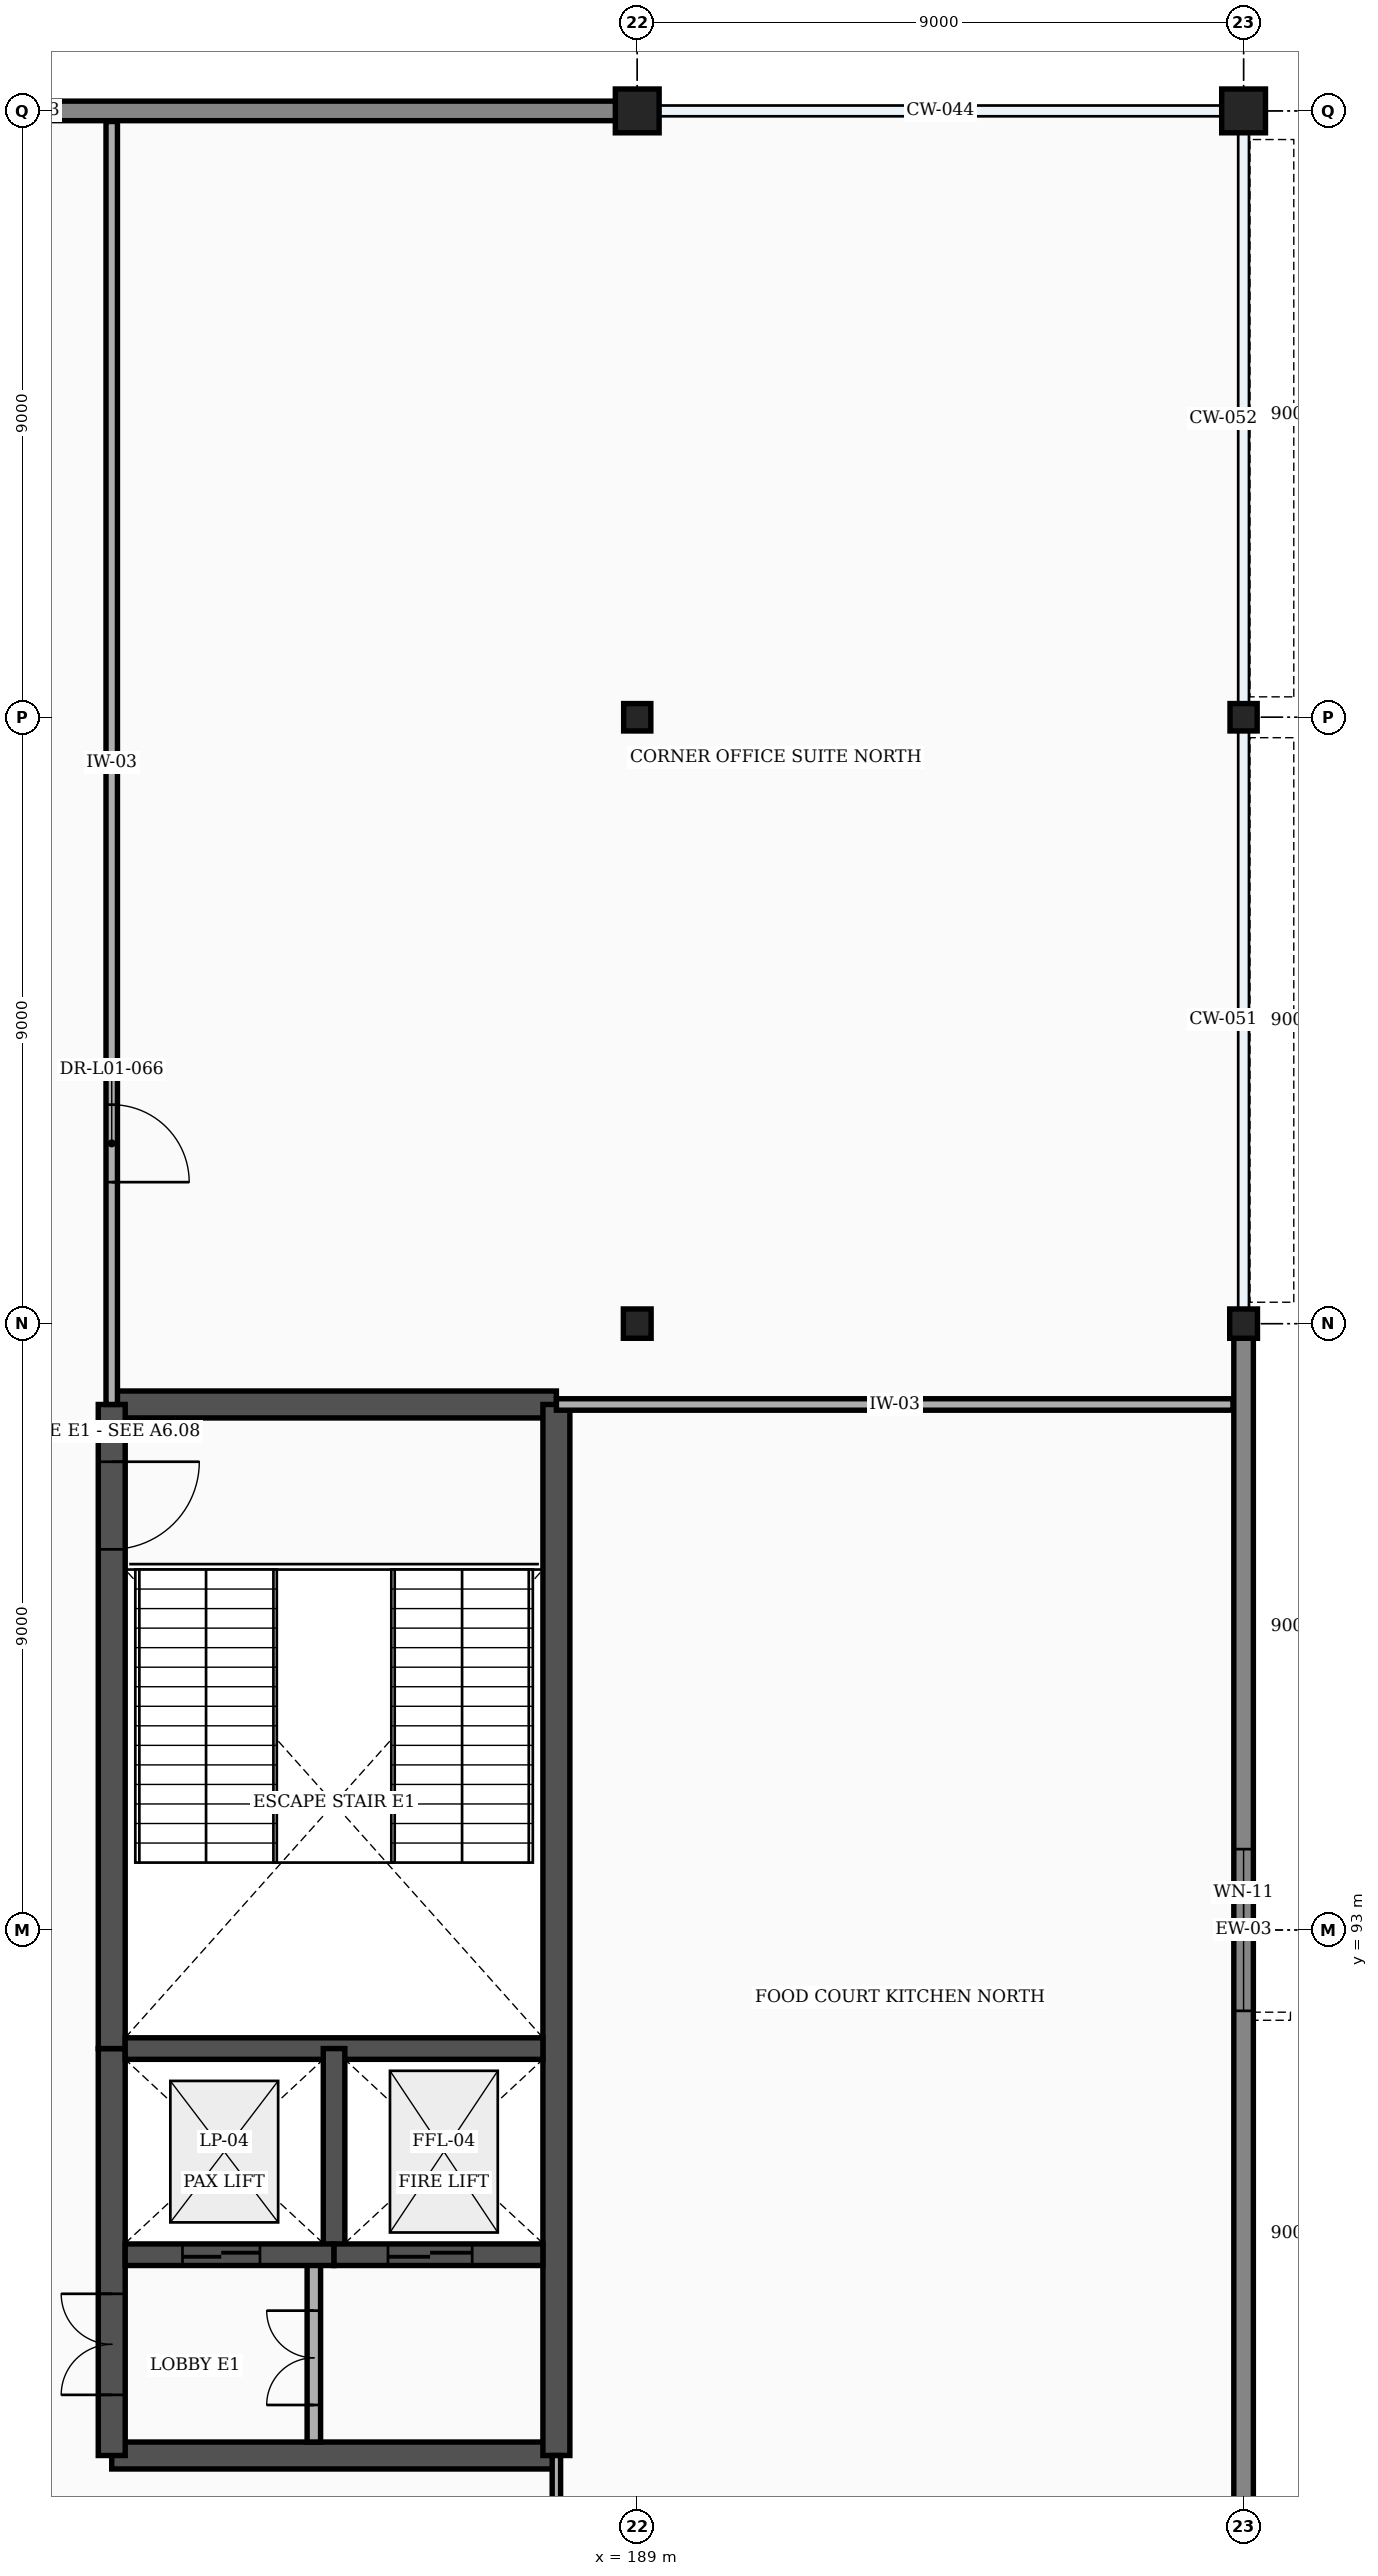
"""IFC4 building model, lengths in metres.
Left out: names, types, materials, properties, quantities, classifications, styles, units other than length and angle.
Written with IfcOpenShell. Run it as: python <this file> out.ifc"""

import sys

from ifc_helpers import new_model, si_unit, direction, frame, frame_2d, origin, origin_2d, place, context, subcontext, project, spatial, rectangle, i_section, extrude, element, fill, save


model = new_model("IFC4")
c1 = context("Model", 3, precision=1e-05, world=origin(), true_north=direction((0.0, 1.0)))
c2 = subcontext(c1, "Body", "Model", "MODEL_VIEW")
j1 = project(units=[si_unit("LENGTHUNIT", "METRE"), si_unit("PLANEANGLEUNIT", "RADIAN")], contexts=[c1])
p1 = place(None, origin())
s1 = spatial("IfcSite", under=j1, at=p1, CompositionType="ELEMENT")
p2 = place(p1, origin())
s2 = spatial("IfcBuilding", under=s1, at=p2, CompositionType="ELEMENT")
p3 = place(p2, frame((0.0, 0.0, 6.0)))
s3 = spatial("IfcBuildingStorey", under=s2, at=p3, CompositionType="ELEMENT", Elevation=6.0)
p4 = place(p3, frame((189.0, 102.0, 0.0), z_axis=(0.0, 0.0, 1.0), x_axis=(1.0, 0.0, 0.0)))
e1 = element("IfcColumn", 1, at=p4, inside=s3, PredefinedType="COLUMN", context=c2, shape_type="SweptSolid", body=[
    extrude(i_section(OverallWidth=0.412, OverallDepth=0.435, WebThickness=0.036, FlangeThickness=0.058, at=origin_2d()), origin(), (0.0, 0.0, 1.0), 5.4),
])
p5 = place(p3, frame((189.0, 111.0, 0.0), z_axis=(0.0, 0.0, 1.0), x_axis=(1.0, 0.0, 0.0)))
e2 = element("IfcColumn", 2, at=p5, inside=s3, PredefinedType="COLUMN", context=c2, shape_type="SweptSolid", body=[
    extrude(i_section(OverallWidth=0.403, OverallDepth=0.406, WebThickness=0.027, FlangeThickness=0.043, at=origin_2d()), origin(), (0.0, 0.0, 1.0), 5.4),
])
p6 = place(p3, frame((189.0, 120.0, 0.0), z_axis=(0.0, 0.0, 1.0), x_axis=(1.0, 0.0, 0.0)))
e3 = element("IfcColumn", 3, at=p6, inside=s3, PredefinedType="COLUMN", context=c2, shape_type="SweptSolid", body=[
    extrude(rectangle(XDim=0.65, YDim=0.65, at=origin_2d()), origin(), (0.0, 0.0, 1.0), 5.4),
])
p7 = place(p3, frame((198.0, 102.0, 0.0), z_axis=(0.0, 0.0, 1.0), x_axis=(1.0, 0.0, 0.0)))
e4 = element("IfcColumn", 4, at=p7, inside=s3, PredefinedType="COLUMN", context=c2, shape_type="SweptSolid", body=[
    extrude(i_section(OverallWidth=0.412, OverallDepth=0.435, WebThickness=0.036, FlangeThickness=0.058, at=origin_2d()), origin(), (0.0, 0.0, 1.0), 5.4),
])
p8 = place(p3, frame((198.0, 111.0, 0.0), z_axis=(0.0, 0.0, 1.0), x_axis=(1.0, 0.0, 0.0)))
e5 = element("IfcColumn", 5, at=p8, inside=s3, PredefinedType="COLUMN", context=c2, shape_type="SweptSolid", body=[
    extrude(i_section(OverallWidth=0.403, OverallDepth=0.406, WebThickness=0.027, FlangeThickness=0.043, at=origin_2d()), origin(), (0.0, 0.0, 1.0), 5.4),
])
p9 = place(p3, frame((198.0, 120.0, 0.0), z_axis=(0.0, 0.0, 1.0), x_axis=(1.0, 0.0, 0.0)))
e6 = element("IfcColumn", 6, at=p9, inside=s3, PredefinedType="COLUMN", context=c2, shape_type="SweptSolid", body=[
    extrude(rectangle(XDim=0.65, YDim=0.65, at=origin_2d()), origin(), (0.0, 0.0, 1.0), 5.4),
])
p10 = place(p3, frame((171.317, 120.0, 0.0), z_axis=(0.0, 0.0, 1.0), x_axis=(1.0, 0.0, 0.0)))
e7 = element("IfcWall", 7, at=p10, inside=s3, PredefinedType="STANDARD", context=c2, shape_type="SweptSolid", body=[
    extrude(rectangle(XDim=17.366, YDim=0.29, at=frame_2d((8.683, 0.0))), origin(), (0.0, 0.0, 1.0), 4.388),
])
p11 = place(p10, frame((0.65, 0.0, 0.85)))
e8 = element("IfcOpeningElement", 8, at=p11, cuts=e7, PredefinedType="OPENING", context=c2, shape_type="SweptSolid", body=[
    extrude(rectangle(XDim=2.4, YDim=2.6, at=frame_2d((1.2, 1.3))), frame((0.0, 0.157, 0.0), z_axis=(0.0, -1.0, 0.0), x_axis=(1.0, 0.0, 0.0)), (0.0, 0.0, 1.0), 0.314),
])
p12 = place(p3, frame((198.0, 84.198, 0.0), z_axis=(0.0, 0.0, 1.0), x_axis=(0.0, 1.0, 0.0)))
e9 = element("IfcWall", 9, at=p12, inside=s3, PredefinedType="STANDARD", context=c2, shape_type="SweptSolid", body=[
    extrude(rectangle(XDim=17.603, YDim=0.29, at=frame_2d((8.802, 0.0))), origin(), (0.0, 0.0, 1.0), 4.467),
])
p13 = place(p12, frame((7.602, 0.0, 0.85)))
e10 = element("IfcOpeningElement", 10, at=p13, cuts=e9, PredefinedType="OPENING", context=c2, shape_type="SweptSolid", body=[
    extrude(rectangle(XDim=2.4, YDim=2.6, at=frame_2d((1.2, 1.3))), frame((0.0, 0.157, 0.0), z_axis=(0.0, -1.0, 0.0), x_axis=(1.0, 0.0, 0.0)), (0.0, 0.0, 1.0), 0.314),
])
for number, where, z_axis, x_axis in (
    (11, (181.2, 85.2, 0.0), (0.0, 0.0, 1.0), (1.0, 0.0, 0.0)),
    (12, (181.2, 100.8, 0.0), (0.0, 0.0, 1.0), (1.0, 0.0, 0.0)),
):
    element("IfcWall", number, at=place(p3, frame(where, z_axis=z_axis, x_axis=x_axis)), inside=s3, PredefinedType="SHEAR", context=c2, shape_type="SweptSolid", body=[
        extrude(rectangle(XDim=6.6, YDim=0.4, at=frame_2d((3.3, 0.0))), origin(), (0.0, 0.0, 1.0), 5.15),
    ])
p14 = place(p3, frame((187.8, 85.2, 0.0), z_axis=(0.0, 0.0, 1.0), x_axis=(0.0, 1.0, 0.0)))
e13 = element("IfcWall", 13, at=p14, inside=s3, PredefinedType="SHEAR", context=c2, shape_type="SweptSolid", body=[
    extrude(rectangle(XDim=15.6, YDim=0.4, at=frame_2d((7.8, 0.0))), origin(), (0.0, 0.0, 1.0), 5.15),
])
p15 = place(p3, frame((181.2, 85.2, 0.0), z_axis=(0.0, 0.0, 1.0), x_axis=(0.0, 1.0, 0.0)))
e14 = element("IfcWall", 14, at=p15, inside=s3, PredefinedType="SHEAR", context=c2, shape_type="SweptSolid", body=[
    extrude(rectangle(XDim=6.04, YDim=0.4, at=frame_2d((3.02, 0.0))), origin(), (0.0, 0.0, 1.0), 5.15),
])
p16 = place(p15, frame((0.9, 0.0, 0.0)))
e15 = element("IfcOpeningElement", 15, at=p16, cuts=e14, PredefinedType="OPENING", context=c2, shape_type="SweptSolid", body=[
    extrude(rectangle(XDim=1.5, YDim=2.2, at=frame_2d((0.75, 1.1))), frame((0.0, 0.212, 0.0), z_axis=(0.0, -1.0, 0.0), x_axis=(1.0, 0.0, 0.0)), (0.0, 0.0, 1.0), 0.424),
])
p17 = place(p3, frame((181.2, 91.24, 0.0), z_axis=(0.0, 0.0, 1.0), x_axis=(0.0, 1.0, 0.0)))
e16 = element("IfcWall", 16, at=p17, inside=s3, PredefinedType="SHEAR", context=c2, shape_type="SweptSolid", body=[
    extrude(rectangle(XDim=9.56, YDim=0.4, at=frame_2d((4.78, 0.0))), origin(), (0.0, 0.0, 1.0), 5.15),
])
p18 = place(p17, frame((7.41, 0.0, 0.0)))
e17 = element("IfcOpeningElement", 17, at=p18, cuts=e16, PredefinedType="OPENING", context=c2, shape_type="SweptSolid", body=[
    extrude(rectangle(XDim=1.3, YDim=2.2, at=frame_2d((0.65, 1.1))), frame((0.0, 0.212, 0.0), z_axis=(0.0, -1.0, 0.0), x_axis=(1.0, 0.0, 0.0)), (0.0, 0.0, 1.0), 0.424),
])
p19 = place(p3, frame((181.4, 91.24, 0.0), z_axis=(0.0, 0.0, 1.0), x_axis=(1.0, 0.0, 0.0)))
e18 = element("IfcWall", 18, at=p19, inside=s3, PredefinedType="SHEAR", context=c2, shape_type="SweptSolid", body=[
    extrude(rectangle(XDim=6.2, YDim=0.32, at=frame_2d((3.1, 0.0))), origin(), (0.0, 0.0, 1.0), 5.15),
])
p20 = place(p3, frame((184.5, 88.18, 0.0), z_axis=(0.0, 0.0, 1.0), x_axis=(0.0, 1.0, 0.0)))
e19 = element("IfcWall", 19, at=p20, inside=s3, PredefinedType="SHEAR", context=c2, shape_type="SweptSolid", body=[
    extrude(rectangle(XDim=3.06, YDim=0.32, at=frame_2d((1.53, 0.0))), origin(), (0.0, 0.0, 1.0), 5.15),
])
p21 = place(p3, frame((184.2, 85.4, 0.0), z_axis=(0.0, 0.0, 1.0), x_axis=(0.0, 1.0, 0.0)))
e20 = element("IfcWall", 20, at=p21, inside=s3, PredefinedType="PARTITIONING", context=c2, shape_type="SweptSolid", body=[
    extrude(rectangle(XDim=2.78, YDim=0.2, at=frame_2d((1.39, 0.0))), origin(), (0.0, 0.0, 1.0), 5.15),
])
p22 = place(p21, frame((0.55, 0.0, 0.0)))
e21 = element("IfcOpeningElement", 21, at=p22, cuts=e20, PredefinedType="OPENING", context=c2, shape_type="SweptSolid", body=[
    extrude(rectangle(XDim=1.4, YDim=2.25, at=frame_2d((0.7, 1.125))), frame((0.0, 0.112, 0.0), z_axis=(0.0, -1.0, 0.0), x_axis=(1.0, 0.0, 0.0)), (0.0, 0.0, 1.0), 0.224),
])
p23 = place(p3, frame((181.4, 88.18, 0.0), z_axis=(0.0, 0.0, 1.0), x_axis=(1.0, 0.0, 0.0)))
e22 = element("IfcWall", 22, at=p23, inside=s3, PredefinedType="SHEAR", context=c2, shape_type="SweptSolid", body=[
    extrude(rectangle(XDim=3.1, YDim=0.32, at=frame_2d((1.55, 0.0))), origin(), (0.0, 0.0, 1.0), 5.15),
])
p24 = place(p23, frame((0.85, 0.0, 0.0)))
e23 = element("IfcOpeningElement", 23, at=p24, cuts=e22, PredefinedType="OPENING", context=c2, shape_type="SweptSolid", body=[
    extrude(rectangle(XDim=1.15, YDim=2.2, at=frame_2d((0.575, 1.1))), frame((0.0, 0.172, 0.0), z_axis=(0.0, -1.0, 0.0), x_axis=(1.0, 0.0, 0.0)), (0.0, 0.0, 1.0), 0.344),
])
p25 = place(p3, frame((184.5, 88.18, 0.0), z_axis=(0.0, 0.0, 1.0), x_axis=(1.0, 0.0, 0.0)))
e24 = element("IfcWall", 24, at=p25, inside=s3, PredefinedType="SHEAR", context=c2, shape_type="SweptSolid", body=[
    extrude(rectangle(XDim=3.1, YDim=0.32, at=frame_2d((1.55, 0.0))), origin(), (0.0, 0.0, 1.0), 5.15),
])
p26 = place(p25, frame((0.8, 0.0, 0.0)))
e25 = element("IfcOpeningElement", 25, at=p26, cuts=e24, PredefinedType="OPENING", context=c2, shape_type="SweptSolid", body=[
    extrude(rectangle(XDim=1.25, YDim=2.25, at=frame_2d((0.625, 1.125))), frame((0.0, 0.172, 0.0), z_axis=(0.0, -1.0, 0.0), x_axis=(1.0, 0.0, 0.0)), (0.0, 0.0, 1.0), 0.344),
])
p27 = place(p3, frame((187.8, 83.2, 0.0), z_axis=(0.0, 0.0, 1.0), x_axis=(0.0, 1.0, 0.0)))
e26 = element("IfcWall", 26, at=p27, inside=s3, PredefinedType="PARTITIONING", context=c2, shape_type="SweptSolid", body=[
    extrude(rectangle(XDim=2.0, YDim=0.125, at=frame_2d((1.0, 0.0))), origin(), (0.0, 0.0, 1.0), 5.15),
])
p28 = place(p3, frame((187.8, 100.8, 0.0), z_axis=(0.0, 0.0, 1.0), x_axis=(1.0, 0.0, 0.0)))
e27 = element("IfcWall", 27, at=p28, inside=s3, PredefinedType="PARTITIONING", context=c2, shape_type="SweptSolid", body=[
    extrude(rectangle(XDim=10.042, YDim=0.17, at=frame_2d((5.021, 0.0))), origin(), (0.0, 0.0, 1.0), 5.15),
])
p29 = place(p3, frame((181.2, 100.8, 0.0), z_axis=(0.0, 0.0, 1.0), x_axis=(0.0, 1.0, 0.0)))
e28 = element("IfcWall", 28, at=p29, inside=s3, PredefinedType="PARTITIONING", context=c2, shape_type="SweptSolid", body=[
    extrude(rectangle(XDim=19.042, YDim=0.17, at=frame_2d((9.521, 0.0))), origin(), (0.0, 0.0, 1.0), 5.15),
])
p30 = place(p29, frame((3.3, 0.0, 0.0)))
e29 = element("IfcOpeningElement", 29, at=p30, cuts=e28, PredefinedType="OPENING", context=c2, shape_type="SweptSolid", body=[
    extrude(rectangle(XDim=1.15, YDim=2.15, at=frame_2d((0.575, 1.075))), frame((0.0, 0.097, 0.0), z_axis=(0.0, -1.0, 0.0), x_axis=(1.0, 0.0, 0.0)), (0.0, 0.0, 1.0), 0.194),
])
p31 = place(p13, origin())
e30 = element("IfcWindow", 30, at=p31, inside=s3, PartitioningType="SINGLE_PANEL", PredefinedType="WINDOW", context=c2, shape_type="SweptSolid", body=[
    extrude(rectangle(XDim=2.4, YDim=2.6, at=frame_2d((1.2, 1.3))), frame((0.0, 0.03, 0.0), z_axis=(0.0, -1.0, 0.0), x_axis=(1.0, 0.0, 0.0)), (0.0, 0.0, 1.0), 0.06),
])
fill(e10, e30)
p32 = place(p16, origin())
e31 = element("IfcDoor", 31, at=p32, inside=s3, OperationType="DOUBLE_DOOR_SINGLE_SWING", PredefinedType="DOOR", context=c2, shape_type="SweptSolid", body=[
    extrude(rectangle(XDim=1.5, YDim=2.2, at=frame_2d((0.75, 1.1))), frame((0.0, 0.025, 0.0), z_axis=(0.0, -1.0, 0.0), x_axis=(1.0, 0.0, 0.0)), (0.0, 0.0, 1.0), 0.05),
])
fill(e15, e31)
p33 = place(p18, frame((1.3, 0.0, 0.0), z_axis=(0.0, 0.0, 1.0), x_axis=(-1.0, 0.0, 0.0)))
e32 = element("IfcDoor", 32, at=p33, inside=s3, OperationType="SINGLE_SWING_LEFT", PredefinedType="DOOR", context=c2, shape_type="SweptSolid", body=[
    extrude(rectangle(XDim=1.3, YDim=2.2, at=frame_2d((0.65, 1.1))), frame((0.0, 0.025, 0.0), z_axis=(0.0, -1.0, 0.0), x_axis=(1.0, 0.0, 0.0)), (0.0, 0.0, 1.0), 0.05),
])
fill(e17, e32)
p34 = place(p22, origin())
e33 = element("IfcDoor", 33, at=p34, inside=s3, OperationType="DOUBLE_DOOR_SINGLE_SWING", PredefinedType="DOOR", context=c2, shape_type="SweptSolid", body=[
    extrude(rectangle(XDim=1.4, YDim=2.25, at=frame_2d((0.7, 1.125))), frame((0.0, 0.025, 0.0), z_axis=(0.0, -1.0, 0.0), x_axis=(1.0, 0.0, 0.0)), (0.0, 0.0, 1.0), 0.05),
])
fill(e21, e33)
p35 = place(p24, origin())
e34 = element("IfcDoor", 34, at=p35, inside=s3, OperationType="DOUBLE_DOOR_SLIDING", PredefinedType="DOOR", context=c2, shape_type="SweptSolid", body=[
    extrude(rectangle(XDim=1.15, YDim=2.2, at=frame_2d((0.575, 1.1))), frame((0.0, 0.025, 0.0), z_axis=(0.0, -1.0, 0.0), x_axis=(1.0, 0.0, 0.0)), (0.0, 0.0, 1.0), 0.05),
])
fill(e23, e34)
p36 = place(p26, origin())
e35 = element("IfcDoor", 35, at=p36, inside=s3, OperationType="DOUBLE_DOOR_SLIDING", PredefinedType="DOOR", context=c2, shape_type="SweptSolid", body=[
    extrude(rectangle(XDim=1.25, YDim=2.25, at=frame_2d((0.625, 1.125))), frame((0.0, 0.025, 0.0), z_axis=(0.0, -1.0, 0.0), x_axis=(1.0, 0.0, 0.0)), (0.0, 0.0, 1.0), 0.05),
])
fill(e25, e35)
p37 = place(p30, frame((1.15, 0.0, 0.0), z_axis=(0.0, 0.0, 1.0), x_axis=(-1.0, 0.0, 0.0)))
e36 = element("IfcDoor", 36, at=p37, inside=s3, OperationType="SINGLE_SWING_RIGHT", PredefinedType="DOOR", context=c2, shape_type="SweptSolid", body=[
    extrude(rectangle(XDim=1.15, YDim=2.15, at=frame_2d((0.575, 1.075))), frame((0.0, 0.025, 0.0), z_axis=(0.0, -1.0, 0.0), x_axis=(1.0, 0.0, 0.0)), (0.0, 0.0, 1.0), 0.05),
])
fill(e29, e36)
save(model, sys.argv[1])
